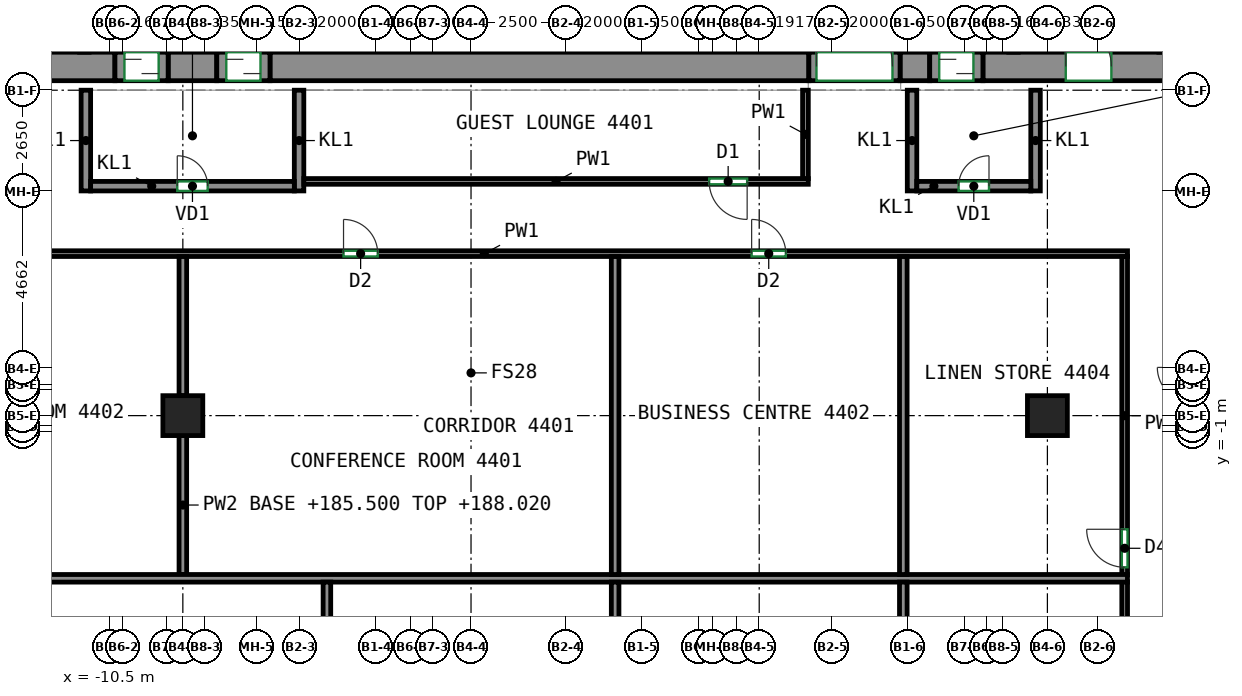
"""IFC4 building model, lengths in metres.
Left out: names, types, materials, properties, quantities, classifications, styles, units other than length and angle.
Written with IfcOpenShell. Run it as: python <this file> out.ifc"""

import sys

from ifc_helpers import new_model, si_unit, direction, frame, frame_2d, origin, origin_2d, place, context, subcontext, project, spatial, rectangle, extrude, source, transform, mapped, element, fill, save


model = new_model("IFC4")
c1 = context("Model", 3, precision=1e-05, world=origin(), true_north=direction((0.0, 1.0)))
c2 = subcontext(c1, "Body", "Model", "MODEL_VIEW")
j1 = project(units=[si_unit("LENGTHUNIT", "METRE"), si_unit("PLANEANGLEUNIT", "RADIAN")], contexts=[c1])
p1 = place(None, origin())
s1 = spatial("IfcSite", under=j1, at=p1, CompositionType="ELEMENT")
p2 = place(p1, origin())
s2 = spatial("IfcBuilding", under=s1, at=p2, CompositionType="ELEMENT")
p3 = place(p2, frame((0.0, 0.0, 185.5)))
s3 = spatial("IfcBuildingStorey", under=s2, at=p3, CompositionType="ELEMENT", Elevation=185.5)
m1 = source(origin(), c2, "Body", "SweptSolid", [
    extrude(rectangle(XDim=1.05, YDim=1.05, at=origin_2d()), origin(), (0.0, 0.0, 1.0), 3.12),
])
for number, where, z_axis, x_axis in (
    (1, (-8.583, -0.562, 0.0), (0.0, 0.0, 1.0), (1.0, 0.0, 0.0)),
    (2, (14.167, -0.562, 0.0), (0.0, 0.0, 1.0), (1.0, 0.0, 0.0)),
):
    element("IfcColumn", number, at=place(p3, frame(where, z_axis=z_axis, x_axis=x_axis)), inside=s3, PredefinedType="COLUMN", context=c2, shape_type="MappedRepresentation", body=[
        mapped(m1, transform((0.0, 0.0, 0.0))),
    ])
m2 = source(origin(), c2, "Body", "SweptSolid", [
    extrude(rectangle(XDim=5.38, YDim=0.75, at=frame_2d((2.69, 0.0))), origin(), (0.0, 0.0, 1.0), 3.12),
])
p4 = place(p3, frame((-15.75, 8.625, 0.0), z_axis=(0.0, 0.0, 1.0), x_axis=(1.0, 0.0, 0.0)))
e3 = element("IfcWall", 3, at=p4, inside=s3, PredefinedType="SHEAR", context=c2, shape_type="MappedRepresentation", body=[
    mapped(m2, transform((0.0, 0.0, 0.0))),
])
p5 = place(p4, frame((2.0, 0.0, 0.0)))
e4 = element("IfcOpeningElement", 4, at=p5, cuts=e3, PredefinedType="OPENING", context=c2, shape_type="SweptSolid", body=[
    extrude(rectangle(XDim=1.2, YDim=2.1, at=frame_2d((0.6, 1.05))), frame((0.0, 0.385, 0.0), z_axis=(0.0, -1.0, 0.0), x_axis=(1.0, 0.0, 0.0)), (0.0, 0.0, 1.0), 0.77),
])
m3 = source(origin(), c2, "Body", "SweptSolid", [
    extrude(rectangle(XDim=1.28, YDim=0.75, at=frame_2d((0.64, 0.0))), origin(), (0.0, 0.0, 1.0), 3.12),
])
p6 = place(p3, frame((-8.97, 8.625, 0.0), z_axis=(0.0, 0.0, 1.0), x_axis=(1.0, 0.0, 0.0)))
e5 = element("IfcWall", 5, at=p6, inside=s3, PredefinedType="SHEAR", context=c2, shape_type="MappedRepresentation", body=[
    mapped(m3, transform((0.0, 0.0, 0.0))),
])
m4 = source(origin(), c2, "Body", "SweptSolid", [
    extrude(rectangle(XDim=14.18, YDim=0.75, at=frame_2d((7.09, 0.0))), origin(), (0.0, 0.0, 1.0), 3.12),
])
p7 = place(p3, frame((-6.29, 8.625, 0.0), z_axis=(0.0, 0.0, 1.0), x_axis=(1.0, 0.0, 0.0)))
e6 = element("IfcWall", 6, at=p7, inside=s3, PredefinedType="SHEAR", context=c2, shape_type="MappedRepresentation", body=[
    mapped(m4, transform((0.0, 0.0, 0.0))),
])
m5 = source(origin(), c2, "Body", "SweptSolid", [
    extrude(rectangle(XDim=0.78, YDim=0.75, at=frame_2d((0.39, 0.0))), origin(), (0.0, 0.0, 1.0), 3.12),
])
p8 = place(p3, frame((10.29, 8.625, 0.0), z_axis=(0.0, 0.0, 1.0), x_axis=(1.0, 0.0, 0.0)))
e7 = element("IfcWall", 7, at=p8, inside=s3, PredefinedType="SHEAR", context=c2, shape_type="MappedRepresentation", body=[
    mapped(m5, transform((0.0, 0.0, 0.0))),
])
m6 = source(origin(), c2, "Body", "SweptSolid", [
    extrude(rectangle(XDim=5.38, YDim=0.75, at=frame_2d((2.69, 0.0))), origin(), (0.0, 0.0, 1.0), 3.12),
])
p9 = place(p3, frame((12.47, 8.625, 0.0), z_axis=(0.0, 0.0, 1.0), x_axis=(1.0, 0.0, 0.0)))
e8 = element("IfcWall", 8, at=p9, inside=s3, PredefinedType="SHEAR", context=c2, shape_type="MappedRepresentation", body=[
    mapped(m6, transform((0.0, 0.0, 0.0))),
])
p10 = place(p9, frame((2.18, 0.0, 0.0)))
e9 = element("IfcOpeningElement", 9, at=p10, cuts=e8, PredefinedType="OPENING", context=c2, shape_type="SweptSolid", body=[
    extrude(rectangle(XDim=1.2, YDim=2.1, at=frame_2d((0.6, 1.05))), frame((0.0, 0.385, 0.0), z_axis=(0.0, -1.0, 0.0), x_axis=(1.0, 0.0, 0.0)), (0.0, 0.0, 1.0), 0.77),
])
m7 = source(origin(), c2, "Body", "SweptSolid", [
    extrude(rectangle(XDim=2.65, YDim=0.25, at=frame_2d((1.325, 0.0))), origin(), (0.0, 0.0, 1.0), 3.12),
])
for number, where, z_axis, x_axis in (
    (10, (-11.135, 5.35, 0.0), (0.0, 0.0, 1.0), (0.0, 1.0, 0.0)),
    (11, (-5.525, 5.35, 0.0), (0.0, 0.0, 1.0), (0.0, 1.0, 0.0)),
):
    element("IfcWall", number, at=place(p3, frame(where, z_axis=z_axis, x_axis=x_axis)), inside=s3, PredefinedType="PARTITIONING", context=c2, shape_type="MappedRepresentation", body=[
        mapped(m7, transform((0.0, 0.0, 0.0))),
    ])
m8 = source(origin(), c2, "Body", "SweptSolid", [
    extrude(rectangle(XDim=5.36, YDim=0.25, at=frame_2d((2.68, 0.0))), origin(), (0.0, 0.0, 1.0), 3.12),
])
p11 = place(p3, frame((-11.01, 5.475, 0.0), z_axis=(0.0, 0.0, 1.0), x_axis=(1.0, 0.0, 0.0)))
e12 = element("IfcWall", 12, at=p11, inside=s3, PredefinedType="PARTITIONING", context=c2, shape_type="MappedRepresentation", body=[
    mapped(m8, transform((0.0, 0.0, 0.0))),
])
p12 = place(p11, frame((2.28, 0.0, 0.0)))
e13 = element("IfcOpeningElement", 13, at=p12, cuts=e12, PredefinedType="OPENING", context=c2, shape_type="SweptSolid", body=[
    extrude(rectangle(XDim=0.8, YDim=2.0, at=frame_2d((0.4, 1.0))), frame((0.0, 0.135, 0.0), z_axis=(0.0, -1.0, 0.0), x_axis=(1.0, 0.0, 0.0)), (0.0, 0.0, 1.0), 0.27),
])
for number, where, z_axis, x_axis in (
    (14, (10.605, 5.35, 0.0), (0.0, 0.0, 1.0), (0.0, 1.0, 0.0)),
    (15, (13.855, 5.35, 0.0), (0.0, 0.0, 1.0), (0.0, 1.0, 0.0)),
):
    element("IfcWall", number, at=place(p3, frame(where, z_axis=z_axis, x_axis=x_axis)), inside=s3, PredefinedType="PARTITIONING", context=c2, shape_type="MappedRepresentation", body=[
        mapped(m7, transform((0.0, 0.0, 0.0))),
    ])
m9 = source(origin(), c2, "Body", "SweptSolid", [
    extrude(rectangle(XDim=3.0, YDim=0.25, at=frame_2d((1.5, 0.0))), origin(), (0.0, 0.0, 1.0), 3.12),
])
p13 = place(p3, frame((10.73, 5.475, 0.0), z_axis=(0.0, 0.0, 1.0), x_axis=(1.0, 0.0, 0.0)))
e16 = element("IfcWall", 16, at=p13, inside=s3, PredefinedType="PARTITIONING", context=c2, shape_type="MappedRepresentation", body=[
    mapped(m9, transform((0.0, 0.0, 0.0))),
])
p14 = place(p13, frame((1.1, 0.0, 0.0)))
e17 = element("IfcOpeningElement", 17, at=p14, cuts=e16, PredefinedType="OPENING", context=c2, shape_type="SweptSolid", body=[
    extrude(rectangle(XDim=0.8, YDim=2.0, at=frame_2d((0.4, 1.0))), frame((0.0, 0.135, 0.0), z_axis=(0.0, -1.0, 0.0), x_axis=(1.0, 0.0, 0.0)), (0.0, 0.0, 1.0), 0.27),
])
m10 = source(origin(), c2, "Body", "SweptSolid", [
    extrude(rectangle(XDim=1.4, YDim=0.75, at=frame_2d((0.7, 0.0))), origin(), (0.0, 0.0, 1.0), 2.7),
])
p15 = place(p3, frame((-10.37, 8.625, 0.0), z_axis=(0.0, 0.0, 1.0), x_axis=(1.0, 0.0, 0.0)))
e18 = element("IfcWall", 18, at=p15, inside=s3, PredefinedType="PARTITIONING", context=c2, shape_type="MappedRepresentation", body=[
    mapped(m10, transform((0.0, 0.0, 0.0))),
])
p16 = place(p15, frame((0.25, 0.0, 0.0)))
e19 = element("IfcOpeningElement", 19, at=p16, cuts=e18, PredefinedType="OPENING", context=c2, shape_type="SweptSolid", body=[
    extrude(rectangle(XDim=0.9, YDim=2.1, at=frame_2d((0.45, 1.05))), frame((0.0, 0.385, 0.0), z_axis=(0.0, -1.0, 0.0), x_axis=(1.0, 0.0, 0.0)), (0.0, 0.0, 1.0), 0.77),
])
m11 = source(origin(), c2, "Body", "SweptSolid", [
    extrude(rectangle(XDim=1.4, YDim=0.75, at=frame_2d((0.7, 0.0))), origin(), (0.0, 0.0, 1.0), 2.7),
])
p17 = place(p3, frame((-7.69, 8.625, 0.0), z_axis=(0.0, 0.0, 1.0), x_axis=(1.0, 0.0, 0.0)))
e20 = element("IfcWall", 20, at=p17, inside=s3, PredefinedType="PARTITIONING", context=c2, shape_type="MappedRepresentation", body=[
    mapped(m11, transform((0.0, 0.0, 0.0))),
])
p18 = place(p17, frame((0.25, 0.0, 0.0)))
e21 = element("IfcOpeningElement", 21, at=p18, cuts=e20, PredefinedType="OPENING", context=c2, shape_type="SweptSolid", body=[
    extrude(rectangle(XDim=0.9, YDim=2.1, at=frame_2d((0.45, 1.05))), frame((0.0, 0.385, 0.0), z_axis=(0.0, -1.0, 0.0), x_axis=(1.0, 0.0, 0.0)), (0.0, 0.0, 1.0), 0.77),
])
m12 = source(origin(), c2, "Body", "SweptSolid", [
    extrude(rectangle(XDim=2.4, YDim=0.75, at=frame_2d((1.2, 0.0))), origin(), (0.0, 0.0, 1.0), 2.7),
])
p19 = place(p3, frame((7.89, 8.625, 0.0), z_axis=(0.0, 0.0, 1.0), x_axis=(1.0, 0.0, 0.0)))
e22 = element("IfcWall", 22, at=p19, inside=s3, PredefinedType="PARTITIONING", context=c2, shape_type="MappedRepresentation", body=[
    mapped(m12, transform((0.0, 0.0, 0.0))),
])
p20 = place(p19, frame((0.2, 0.0, 0.0)))
e23 = element("IfcOpeningElement", 23, at=p20, cuts=e22, PredefinedType="OPENING", context=c2, shape_type="SweptSolid", body=[
    extrude(rectangle(XDim=2.0, YDim=2.1, at=frame_2d((1.0, 1.05))), frame((0.0, 0.385, 0.0), z_axis=(0.0, -1.0, 0.0), x_axis=(1.0, 0.0, 0.0)), (0.0, 0.0, 1.0), 0.77),
])
p21 = place(p3, frame((11.07, 8.625, 0.0), z_axis=(0.0, 0.0, 1.0), x_axis=(1.0, 0.0, 0.0)))
e24 = element("IfcWall", 24, at=p21, inside=s3, PredefinedType="PARTITIONING", context=c2, shape_type="MappedRepresentation", body=[
    mapped(m11, transform((0.0, 0.0, 0.0))),
])
p22 = place(p21, frame((0.25, 0.0, 0.0)))
e25 = element("IfcOpeningElement", 25, at=p22, cuts=e24, PredefinedType="OPENING", context=c2, shape_type="SweptSolid", body=[
    extrude(rectangle(XDim=0.9, YDim=2.1, at=frame_2d((0.45, 1.05))), frame((0.0, 0.385, 0.0), z_axis=(0.0, -1.0, 0.0), x_axis=(1.0, 0.0, 0.0)), (0.0, 0.0, 1.0), 0.77),
])
p23 = place(p3, frame((7.875, 5.6, 0.0), z_axis=(0.0, 0.0, 1.0), x_axis=(-1.0, 0.0, 0.0)))
e26 = element("IfcWall", 26, at=p23, inside=s3, PredefinedType="PARTITIONING", context=c2, shape_type="SweptSolid", body=[
    extrude(rectangle(XDim=13.275, YDim=0.15, at=frame_2d((6.637, 0.0))), origin(), (0.0, 0.0, 1.0), 3.12),
])
p24 = place(p23, frame((1.609, 0.0, 0.0)))
e27 = element("IfcOpeningElement", 27, at=p24, cuts=e26, PredefinedType="OPENING", context=c2, shape_type="SweptSolid", body=[
    extrude(rectangle(XDim=1.0, YDim=2.1, at=frame_2d((0.5, 1.05))), frame((0.0, 0.085, 0.0), z_axis=(0.0, -1.0, 0.0), x_axis=(1.0, 0.0, 0.0)), (0.0, 0.0, 1.0), 0.17),
])
p25 = place(p3, frame((7.8, 8.0, 0.0), z_axis=(0.0, 0.0, 1.0), x_axis=(0.0, -1.0, 0.0)))
e28 = element("IfcWall", 28, at=p25, inside=s3, PredefinedType="PARTITIONING", context=c2, shape_type="SweptSolid", body=[
    extrude(rectangle(XDim=2.325, YDim=0.15, at=frame_2d((1.163, 0.0))), origin(), (0.0, 0.0, 1.0), 3.12),
])
p26 = place(p3, frame((-17.575, 3.7, 0.0), z_axis=(0.0, 0.0, 1.0), x_axis=(1.0, 0.0, 0.0)))
e29 = element("IfcWall", 29, at=p26, inside=s3, PredefinedType="PARTITIONING", context=c2, shape_type="SweptSolid", body=[
    extrude(rectangle(XDim=33.85, YDim=0.15, at=frame_2d((16.925, 0.0))), origin(), (0.0, 0.0, 1.0), 3.12),
])
p27 = place(p26, frame((4.201, 0.0, 0.0)))
e30 = element("IfcOpeningElement", 30, at=p27, cuts=e29, PredefinedType="OPENING", context=c2, shape_type="SweptSolid", body=[
    extrude(rectangle(XDim=0.9, YDim=2.1, at=frame_2d((0.45, 1.05))), frame((0.0, 0.085, 0.0), z_axis=(0.0, -1.0, 0.0), x_axis=(1.0, 0.0, 0.0)), (0.0, 0.0, 1.0), 0.17),
])
p28 = place(p26, frame((13.22, 0.0, 0.0)))
e31 = element("IfcOpeningElement", 31, at=p28, cuts=e29, PredefinedType="OPENING", context=c2, shape_type="SweptSolid", body=[
    extrude(rectangle(XDim=0.9, YDim=2.1, at=frame_2d((0.45, 1.05))), frame((0.0, 0.085, 0.0), z_axis=(0.0, -1.0, 0.0), x_axis=(1.0, 0.0, 0.0)), (0.0, 0.0, 1.0), 0.17),
])
p29 = place(p26, frame((23.959, 0.0, 0.0)))
e32 = element("IfcOpeningElement", 32, at=p29, cuts=e29, PredefinedType="OPENING", context=c2, shape_type="SweptSolid", body=[
    extrude(rectangle(XDim=0.9, YDim=2.1, at=frame_2d((0.45, 1.05))), frame((0.0, 0.085, 0.0), z_axis=(0.0, -1.0, 0.0), x_axis=(1.0, 0.0, 0.0)), (0.0, 0.0, 1.0), 0.17),
])
p30 = place(p3, frame((16.2, -4.753, 0.0), z_axis=(0.0, 0.0, 1.0), x_axis=(0.0, 1.0, 0.0)))
e33 = element("IfcWall", 33, at=p30, inside=s3, PredefinedType="PARTITIONING", context=c2, shape_type="SweptSolid", body=[
    extrude(rectangle(XDim=8.378, YDim=0.15, at=frame_2d((4.189, 0.0))), origin(), (0.0, 0.0, 1.0), 3.12),
])
p31 = place(p30, frame((0.2, 0.0, 0.0)))
e34 = element("IfcOpeningElement", 34, at=p31, cuts=e33, PredefinedType="OPENING", context=c2, shape_type="SweptSolid", body=[
    extrude(rectangle(XDim=1.0, YDim=2.1, at=frame_2d((0.5, 1.05))), frame((0.0, 0.085, 0.0), z_axis=(0.0, -1.0, 0.0), x_axis=(1.0, 0.0, 0.0)), (0.0, 0.0, 1.0), 0.17),
])
p32 = place(p3, frame((16.2, -15.425, 0.0), z_axis=(0.0, 0.0, 1.0), x_axis=(0.0, 1.0, 0.0)))
e35 = element("IfcWall", 35, at=p32, inside=s3, PredefinedType="PARTITIONING", context=c2, shape_type="SweptSolid", body=[
    extrude(rectangle(XDim=10.492, YDim=0.15, at=frame_2d((5.246, 0.0))), origin(), (0.0, 0.0, 1.0), 3.12),
])
p33 = place(p32, frame((1.614, 0.0, 0.0)))
e36 = element("IfcOpeningElement", 36, at=p33, cuts=e35, PredefinedType="OPENING", context=c2, shape_type="SweptSolid", body=[
    extrude(rectangle(XDim=0.9, YDim=2.1, at=frame_2d((0.45, 1.05))), frame((0.0, 0.085, 0.0), z_axis=(0.0, -1.0, 0.0), x_axis=(1.0, 0.0, 0.0)), (0.0, 0.0, 1.0), 0.17),
])
p34 = place(p3, frame((-8.583, -0.037, 0.0), z_axis=(0.0, 0.0, 1.0), x_axis=(0.0, 1.0, 0.0)))
e37 = element("IfcWall", 37, at=p34, inside=s3, PredefinedType="PARTITIONING", context=c2, shape_type="SweptSolid", body=[
    extrude(rectangle(XDim=3.66, YDim=0.2, at=frame_2d((1.83, 0.0))), origin(), (0.0, 0.0, 1.0), 3.12),
])
p35 = place(p3, frame((-8.583, -4.743, 0.0), z_axis=(0.0, 0.0, 1.0), x_axis=(0.0, 1.0, 0.0)))
e38 = element("IfcWall", 38, at=p35, inside=s3, PredefinedType="PARTITIONING", context=c2, shape_type="SweptSolid", body=[
    extrude(rectangle(XDim=3.656, YDim=0.2, at=frame_2d((1.828, 0.0))), origin(), (0.0, 0.0, 1.0), 2.52),
])
p36 = place(p3, frame((-13.873, -4.843, 0.0), z_axis=(0.0, 0.0, 1.0), x_axis=(1.0, 0.0, 0.0)))
e39 = element("IfcWall", 39, at=p36, inside=s3, PredefinedType="PARTITIONING", context=c2, shape_type="SweptSolid", body=[
    extrude(rectangle(XDim=30.146, YDim=0.2, at=frame_2d((15.073, 0.0))), origin(), (0.0, 0.0, 1.0), 3.12),
])
for number, where, z_axis, x_axis in (
    (40, (2.792, -4.743, 0.0), (0.0, 0.0, 1.0), (0.0, 1.0, 0.0)),
    (41, (10.375, -4.743, 0.0), (0.0, 0.0, 1.0), (0.0, 1.0, 0.0)),
):
    element("IfcWall", number, at=place(p3, frame(where, z_axis=z_axis, x_axis=x_axis)), inside=s3, PredefinedType="PARTITIONING", context=c2, shape_type="SweptSolid", body=[
        extrude(rectangle(XDim=8.366, YDim=0.2, at=frame_2d((4.183, 0.0))), origin(), (0.0, 0.0, 1.0), 3.12),
    ])
for number, where, z_axis, x_axis in (
    (42, (-4.792, -15.423, 0.0), (0.0, 0.0, 1.0), (0.0, 1.0, 0.0)),
    (43, (2.792, -15.423, 0.0), (0.0, 0.0, 1.0), (0.0, 1.0, 0.0)),
    (44, (10.375, -15.423, 0.0), (0.0, 0.0, 1.0), (0.0, 1.0, 0.0)),
):
    element("IfcWall", number, at=place(p3, frame(where, z_axis=z_axis, x_axis=x_axis)), inside=s3, PredefinedType="PARTITIONING", context=c2, shape_type="SweptSolid", body=[
        extrude(rectangle(XDim=10.48, YDim=0.2, at=frame_2d((5.24, 0.0))), origin(), (0.0, 0.0, 1.0), 3.12),
    ])
p37 = place(p20, origin())
e45 = element("IfcDoor", 45, at=p37, inside=s3, OperationType="DOUBLE_DOOR_SINGLE_SWING", PredefinedType="DOOR", context=c2, shape_type="SweptSolid", body=[
    extrude(rectangle(XDim=2.0, YDim=2.1, at=frame_2d((1.0, 1.05))), frame((0.0, 0.28, 0.0), z_axis=(0.0, -1.0, 0.0), x_axis=(1.0, 0.0, 0.0)), (0.0, 0.0, 1.0), 0.05),
])
fill(e23, e45)
p38 = place(p12, origin())
e46 = element("IfcDoor", 46, at=p38, inside=s3, OperationType="SINGLE_SWING_LEFT", PredefinedType="DOOR", context=c2, shape_type="SweptSolid", body=[
    extrude(rectangle(XDim=0.8, YDim=2.0, at=frame_2d((0.4, 1.0))), frame((0.0, 0.025, 0.0), z_axis=(0.0, -1.0, 0.0), x_axis=(1.0, 0.0, 0.0)), (0.0, 0.0, 1.0), 0.05),
])
fill(e13, e46)
p39 = place(p14, origin())
e47 = element("IfcDoor", 47, at=p39, inside=s3, OperationType="SINGLE_SWING_RIGHT", PredefinedType="DOOR", context=c2, shape_type="SweptSolid", body=[
    extrude(rectangle(XDim=0.8, YDim=2.0, at=frame_2d((0.4, 1.0))), frame((0.0, 0.025, 0.0), z_axis=(0.0, -1.0, 0.0), x_axis=(1.0, 0.0, 0.0)), (0.0, 0.0, 1.0), 0.05),
])
fill(e17, e47)
p40 = place(p16, origin())
e48 = element("IfcDoor", 48, at=p40, inside=s3, OperationType="SLIDING_TO_LEFT", PredefinedType="DOOR", context=c2, shape_type="SweptSolid", body=[
    extrude(rectangle(XDim=0.9, YDim=2.1, at=frame_2d((0.45, 1.05))), frame((0.0, 0.28, 0.0), z_axis=(0.0, -1.0, 0.0), x_axis=(1.0, 0.0, 0.0)), (0.0, 0.0, 1.0), 0.05),
])
fill(e19, e48)
p41 = place(p18, origin())
e49 = element("IfcDoor", 49, at=p41, inside=s3, OperationType="SLIDING_TO_RIGHT", PredefinedType="DOOR", context=c2, shape_type="SweptSolid", body=[
    extrude(rectangle(XDim=0.9, YDim=2.1, at=frame_2d((0.45, 1.05))), frame((0.0, 0.28, 0.0), z_axis=(0.0, -1.0, 0.0), x_axis=(1.0, 0.0, 0.0)), (0.0, 0.0, 1.0), 0.05),
])
fill(e21, e49)
p42 = place(p22, origin())
e50 = element("IfcDoor", 50, at=p42, inside=s3, OperationType="SLIDING_TO_LEFT", PredefinedType="DOOR", context=c2, shape_type="SweptSolid", body=[
    extrude(rectangle(XDim=0.9, YDim=2.1, at=frame_2d((0.45, 1.05))), frame((0.0, 0.28, 0.0), z_axis=(0.0, -1.0, 0.0), x_axis=(1.0, 0.0, 0.0)), (0.0, 0.0, 1.0), 0.05),
])
fill(e25, e50)
p43 = place(p10, origin())
e51 = element("IfcDoor", 51, at=p43, inside=s3, OperationType="DOUBLE_DOOR_SINGLE_SWING", PredefinedType="DOOR", context=c2, shape_type="SweptSolid", body=[
    extrude(rectangle(XDim=1.2, YDim=2.1, at=frame_2d((0.6, 1.05))), frame((0.0, 0.28, 0.0), z_axis=(0.0, -1.0, 0.0), x_axis=(1.0, 0.0, 0.0)), (0.0, 0.0, 1.0), 0.05),
])
fill(e9, e51)
p44 = place(p31, origin())
e52 = element("IfcDoor", 52, at=p44, inside=s3, OperationType="SINGLE_SWING_RIGHT", PredefinedType="DOOR", context=c2, shape_type="SweptSolid", body=[
    extrude(rectangle(XDim=1.0, YDim=2.1, at=frame_2d((0.5, 1.05))), frame((0.0, 0.025, 0.0), z_axis=(0.0, -1.0, 0.0), x_axis=(1.0, 0.0, 0.0)), (0.0, 0.0, 1.0), 0.05),
])
fill(e34, e52)
p45 = place(p28, origin())
e53 = element("IfcDoor", 53, at=p45, inside=s3, OperationType="SINGLE_SWING_LEFT", PredefinedType="DOOR", context=c2, shape_type="SweptSolid", body=[
    extrude(rectangle(XDim=0.9, YDim=2.1, at=frame_2d((0.45, 1.05))), frame((0.0, 0.025, 0.0), z_axis=(0.0, -1.0, 0.0), x_axis=(1.0, 0.0, 0.0)), (0.0, 0.0, 1.0), 0.05),
])
fill(e31, e53)
p46 = place(p29, origin())
e54 = element("IfcDoor", 54, at=p46, inside=s3, OperationType="SINGLE_SWING_LEFT", PredefinedType="DOOR", context=c2, shape_type="SweptSolid", body=[
    extrude(rectangle(XDim=0.9, YDim=2.1, at=frame_2d((0.45, 1.05))), frame((0.0, 0.025, 0.0), z_axis=(0.0, -1.0, 0.0), x_axis=(1.0, 0.0, 0.0)), (0.0, 0.0, 1.0), 0.05),
])
fill(e32, e54)
p47 = place(p24, origin())
e55 = element("IfcDoor", 55, at=p47, inside=s3, OperationType="SINGLE_SWING_LEFT", PredefinedType="DOOR", context=c2, shape_type="SweptSolid", body=[
    extrude(rectangle(XDim=1.0, YDim=2.1, at=frame_2d((0.5, 1.05))), frame((0.0, 0.025, 0.0), z_axis=(0.0, -1.0, 0.0), x_axis=(1.0, 0.0, 0.0)), (0.0, 0.0, 1.0), 0.05),
])
fill(e27, e55)
save(model, sys.argv[1])
